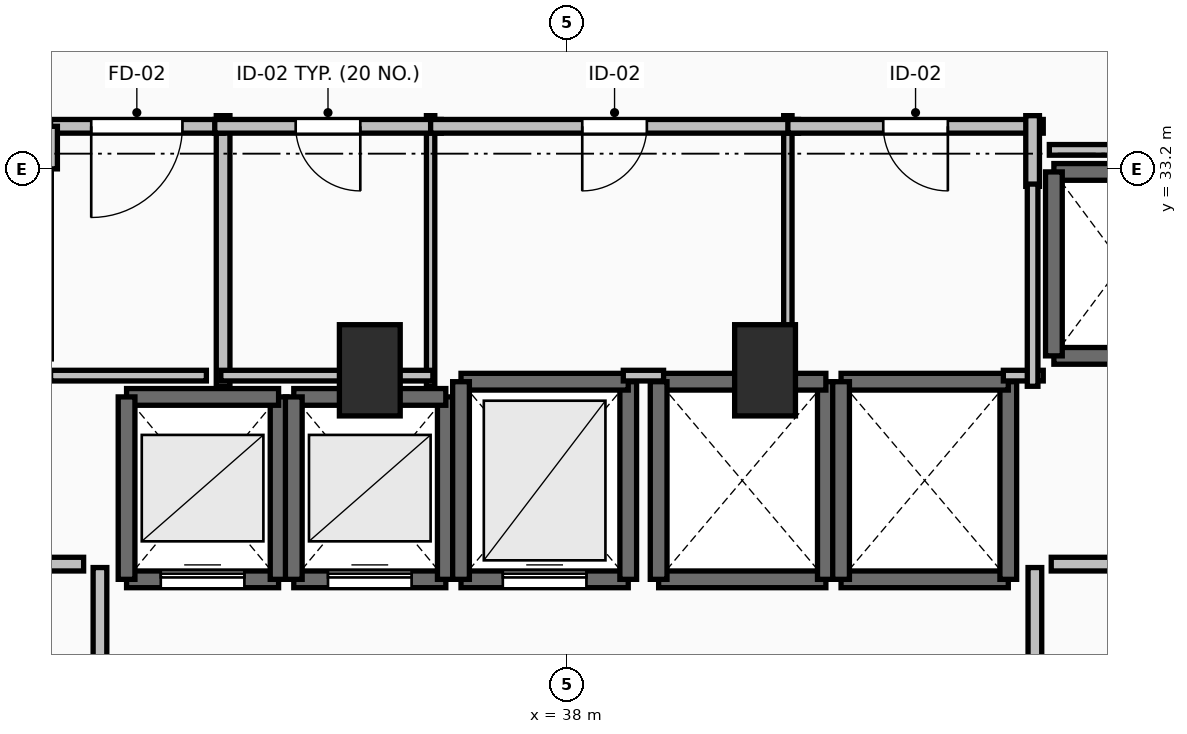
"""IFC4 building model, lengths in metres.
Left out: names, types, materials, properties, quantities, classifications, styles, units other than length and angle.
Written with IfcOpenShell. Run it as: python <this file> out.ifc"""

import sys

from ifc_helpers import new_model, si_unit, direction, frame, frame_2d, origin, origin_2d, place, context, subcontext, project, spatial, rectangle, extrude, element, fill, save


model = new_model("IFC4")
c1 = context("Model", 3, precision=1e-05, world=origin(), true_north=direction((0.0, 1.0)))
c2 = subcontext(c1, "Body", "Model", "MODEL_VIEW")
j1 = project(units=[si_unit("LENGTHUNIT", "METRE"), si_unit("PLANEANGLEUNIT", "RADIAN")], contexts=[c1])
p1 = place(None, origin())
s1 = spatial("IfcSite", under=j1, at=p1, CompositionType="ELEMENT")
p2 = place(p1, origin())
s2 = spatial("IfcBuilding", under=s1, at=p2, CompositionType="ELEMENT")
p3 = place(p2, frame((0.0, 0.0, 113.8)))
s3 = spatial("IfcBuildingStorey", under=s2, at=p3, CompositionType="ELEMENT", Elevation=113.8)
for number, where, z_axis, x_axis in (
    (1, (35.4, 30.55, 0.0), (0.0, 0.0, 1.0), (1.0, 0.0, 0.0)),
    (2, (40.6, 30.55, 0.0), (0.0, 0.0, 1.0), (1.0, 0.0, 0.0)),
):
    element("IfcColumn", number, at=place(p3, frame(where, z_axis=z_axis, x_axis=x_axis)), inside=s3, PredefinedType="PILASTER", context=c2, shape_type="SweptSolid", body=[
        extrude(rectangle(XDim=0.8, YDim=1.2, at=origin_2d()), origin(), (0.0, 0.0, 1.0), 3.5),
    ])
p4 = place(p3, frame((32.2, 27.8, 0.0), z_axis=(0.0, 0.0, 1.0), x_axis=(1.0, 0.0, 0.0)))
e3 = element("IfcWall", 3, at=p4, inside=s3, PredefinedType="SOLIDWALL", context=c2, shape_type="SweptSolid", body=[
    extrude(rectangle(XDim=2.0, YDim=0.22, at=frame_2d((1.0, 0.0))), origin(), (0.0, 0.0, 1.0), 3.24),
])
p5 = place(p4, frame((0.45, 0.0, 0.0)))
e4 = element("IfcOpeningElement", 4, at=p5, cuts=e3, PredefinedType="OPENING", context=c2, shape_type="SweptSolid", body=[
    extrude(rectangle(XDim=1.1, YDim=2.2, at=frame_2d((0.55, 1.1))), frame((0.0, 0.125, 0.0), z_axis=(0.0, -1.0, 0.0), x_axis=(1.0, 0.0, 0.0)), (0.0, 0.0, 1.0), 0.25),
])
p6 = place(p3, frame((34.2, 27.8, 0.0), z_axis=(0.0, 0.0, 1.0), x_axis=(0.0, 1.0, 0.0)))
e5 = element("IfcWall", 5, at=p6, inside=s3, PredefinedType="SOLIDWALL", context=c2, shape_type="SweptSolid", body=[
    extrude(rectangle(XDim=2.4, YDim=0.22, at=frame_2d((1.2, 0.0))), origin(), (0.0, 0.0, 1.0), 3.24),
])
p7 = place(p3, frame((34.2, 30.2, 0.0), z_axis=(0.0, 0.0, 1.0), x_axis=(-1.0, 0.0, 0.0)))
e6 = element("IfcWall", 6, at=p7, inside=s3, PredefinedType="SOLIDWALL", context=c2, shape_type="SweptSolid", body=[
    extrude(rectangle(XDim=2.0, YDim=0.22, at=frame_2d((1.0, 0.0))), origin(), (0.0, 0.0, 1.0), 3.24),
])
p8 = place(p3, frame((32.2, 30.2, 0.0), z_axis=(0.0, 0.0, 1.0), x_axis=(0.0, -1.0, 0.0)))
e7 = element("IfcWall", 7, at=p8, inside=s3, PredefinedType="SOLIDWALL", context=c2, shape_type="SweptSolid", body=[
    extrude(rectangle(XDim=2.4, YDim=0.22, at=frame_2d((1.2, 0.0))), origin(), (0.0, 0.0, 1.0), 3.24),
])
p9 = place(p3, frame((34.4, 27.8, 0.0), z_axis=(0.0, 0.0, 1.0), x_axis=(1.0, 0.0, 0.0)))
e8 = element("IfcWall", 8, at=p9, inside=s3, PredefinedType="SOLIDWALL", context=c2, shape_type="SweptSolid", body=[
    extrude(rectangle(XDim=2.0, YDim=0.22, at=frame_2d((1.0, 0.0))), origin(), (0.0, 0.0, 1.0), 3.24),
])
p10 = place(p9, frame((0.45, 0.0, 0.0)))
e9 = element("IfcOpeningElement", 9, at=p10, cuts=e8, PredefinedType="OPENING", context=c2, shape_type="SweptSolid", body=[
    extrude(rectangle(XDim=1.1, YDim=2.2, at=frame_2d((0.55, 1.1))), frame((0.0, 0.125, 0.0), z_axis=(0.0, -1.0, 0.0), x_axis=(1.0, 0.0, 0.0)), (0.0, 0.0, 1.0), 0.25),
])
p11 = place(p3, frame((36.4, 27.8, 0.0), z_axis=(0.0, 0.0, 1.0), x_axis=(0.0, 1.0, 0.0)))
e10 = element("IfcWall", 10, at=p11, inside=s3, PredefinedType="SOLIDWALL", context=c2, shape_type="SweptSolid", body=[
    extrude(rectangle(XDim=2.4, YDim=0.22, at=frame_2d((1.2, 0.0))), origin(), (0.0, 0.0, 1.0), 3.24),
])
p12 = place(p3, frame((36.4, 30.2, 0.0), z_axis=(0.0, 0.0, 1.0), x_axis=(-1.0, 0.0, 0.0)))
e11 = element("IfcWall", 11, at=p12, inside=s3, PredefinedType="SOLIDWALL", context=c2, shape_type="SweptSolid", body=[
    extrude(rectangle(XDim=2.0, YDim=0.22, at=frame_2d((1.0, 0.0))), origin(), (0.0, 0.0, 1.0), 3.24),
])
p13 = place(p3, frame((34.4, 30.2, 0.0), z_axis=(0.0, 0.0, 1.0), x_axis=(0.0, -1.0, 0.0)))
e12 = element("IfcWall", 12, at=p13, inside=s3, PredefinedType="SOLIDWALL", context=c2, shape_type="SweptSolid", body=[
    extrude(rectangle(XDim=2.4, YDim=0.22, at=frame_2d((1.2, 0.0))), origin(), (0.0, 0.0, 1.0), 3.24),
])
p14 = place(p3, frame((36.6, 27.8, 0.0), z_axis=(0.0, 0.0, 1.0), x_axis=(1.0, 0.0, 0.0)))
e13 = element("IfcWall", 13, at=p14, inside=s3, PredefinedType="SOLIDWALL", context=c2, shape_type="SweptSolid", body=[
    extrude(rectangle(XDim=2.2, YDim=0.22, at=frame_2d((1.1, 0.0))), origin(), (0.0, 0.0, 1.0), 3.24),
])
p15 = place(p14, frame((0.55, 0.0, 0.0)))
e14 = element("IfcOpeningElement", 14, at=p15, cuts=e13, PredefinedType="OPENING", context=c2, shape_type="SweptSolid", body=[
    extrude(rectangle(XDim=1.1, YDim=2.2, at=frame_2d((0.55, 1.1))), frame((0.0, 0.125, 0.0), z_axis=(0.0, -1.0, 0.0), x_axis=(1.0, 0.0, 0.0)), (0.0, 0.0, 1.0), 0.25),
])
p16 = place(p3, frame((38.8, 27.8, 0.0), z_axis=(0.0, 0.0, 1.0), x_axis=(0.0, 1.0, 0.0)))
e15 = element("IfcWall", 15, at=p16, inside=s3, PredefinedType="SOLIDWALL", context=c2, shape_type="SweptSolid", body=[
    extrude(rectangle(XDim=2.6, YDim=0.22, at=frame_2d((1.3, 0.0))), origin(), (0.0, 0.0, 1.0), 3.24),
])
p17 = place(p3, frame((38.8, 30.4, 0.0), z_axis=(0.0, 0.0, 1.0), x_axis=(-1.0, 0.0, 0.0)))
e16 = element("IfcWall", 16, at=p17, inside=s3, PredefinedType="SOLIDWALL", context=c2, shape_type="SweptSolid", body=[
    extrude(rectangle(XDim=2.2, YDim=0.22, at=frame_2d((1.1, 0.0))), origin(), (0.0, 0.0, 1.0), 3.24),
])
p18 = place(p3, frame((36.6, 30.4, 0.0), z_axis=(0.0, 0.0, 1.0), x_axis=(0.0, -1.0, 0.0)))
e17 = element("IfcWall", 17, at=p18, inside=s3, PredefinedType="SOLIDWALL", context=c2, shape_type="SweptSolid", body=[
    extrude(rectangle(XDim=2.6, YDim=0.22, at=frame_2d((1.3, 0.0))), origin(), (0.0, 0.0, 1.0), 3.24),
])
p19 = place(p3, frame((39.2, 27.8, 0.0), z_axis=(0.0, 0.0, 1.0), x_axis=(1.0, 0.0, 0.0)))
e18 = element("IfcWall", 18, at=p19, inside=s3, PredefinedType="SOLIDWALL", context=c2, shape_type="SweptSolid", body=[
    extrude(rectangle(XDim=2.2, YDim=0.22, at=frame_2d((1.1, 0.0))), origin(), (0.0, 0.0, 1.0), 3.24),
])
p20 = place(p3, frame((41.4, 27.8, 0.0), z_axis=(0.0, 0.0, 1.0), x_axis=(0.0, 1.0, 0.0)))
e19 = element("IfcWall", 19, at=p20, inside=s3, PredefinedType="SOLIDWALL", context=c2, shape_type="SweptSolid", body=[
    extrude(rectangle(XDim=2.6, YDim=0.22, at=frame_2d((1.3, 0.0))), origin(), (0.0, 0.0, 1.0), 3.24),
])
p21 = place(p3, frame((41.4, 30.4, 0.0), z_axis=(0.0, 0.0, 1.0), x_axis=(-1.0, 0.0, 0.0)))
e20 = element("IfcWall", 20, at=p21, inside=s3, PredefinedType="SOLIDWALL", context=c2, shape_type="SweptSolid", body=[
    extrude(rectangle(XDim=2.2, YDim=0.22, at=frame_2d((1.1, 0.0))), origin(), (0.0, 0.0, 1.0), 3.24),
])
p22 = place(p3, frame((39.2, 30.4, 0.0), z_axis=(0.0, 0.0, 1.0), x_axis=(0.0, -1.0, 0.0)))
e21 = element("IfcWall", 21, at=p22, inside=s3, PredefinedType="SOLIDWALL", context=c2, shape_type="SweptSolid", body=[
    extrude(rectangle(XDim=2.6, YDim=0.22, at=frame_2d((1.3, 0.0))), origin(), (0.0, 0.0, 1.0), 3.24),
])
p23 = place(p3, frame((41.6, 27.8, 0.0), z_axis=(0.0, 0.0, 1.0), x_axis=(1.0, 0.0, 0.0)))
e22 = element("IfcWall", 22, at=p23, inside=s3, PredefinedType="SOLIDWALL", context=c2, shape_type="SweptSolid", body=[
    extrude(rectangle(XDim=2.2, YDim=0.22, at=frame_2d((1.1, 0.0))), origin(), (0.0, 0.0, 1.0), 3.24),
])
p24 = place(p3, frame((43.8, 27.8, 0.0), z_axis=(0.0, 0.0, 1.0), x_axis=(0.0, 1.0, 0.0)))
e23 = element("IfcWall", 23, at=p24, inside=s3, PredefinedType="SOLIDWALL", context=c2, shape_type="SweptSolid", body=[
    extrude(rectangle(XDim=2.6, YDim=0.22, at=frame_2d((1.3, 0.0))), origin(), (0.0, 0.0, 1.0), 3.24),
])
p25 = place(p3, frame((43.8, 30.4, 0.0), z_axis=(0.0, 0.0, 1.0), x_axis=(-1.0, 0.0, 0.0)))
e24 = element("IfcWall", 24, at=p25, inside=s3, PredefinedType="SOLIDWALL", context=c2, shape_type="SweptSolid", body=[
    extrude(rectangle(XDim=2.2, YDim=0.22, at=frame_2d((1.1, 0.0))), origin(), (0.0, 0.0, 1.0), 3.24),
])
p26 = place(p3, frame((41.6, 30.4, 0.0), z_axis=(0.0, 0.0, 1.0), x_axis=(0.0, -1.0, 0.0)))
e25 = element("IfcWall", 25, at=p26, inside=s3, PredefinedType="SOLIDWALL", context=c2, shape_type="SweptSolid", body=[
    extrude(rectangle(XDim=2.6, YDim=0.22, at=frame_2d((1.3, 0.0))), origin(), (0.0, 0.0, 1.0), 3.24),
])
for number, where, z_axis, x_axis in (
    (26, (44.4, 30.74, 0.0), (0.0, 0.0, 1.0), (1.0, 0.0, 0.0)),
    (27, (46.2, 33.16, 0.0), (0.0, 0.0, 1.0), (-1.0, 0.0, 0.0)),
):
    element("IfcWall", number, at=place(p3, frame(where, z_axis=z_axis, x_axis=x_axis)), inside=s3, PredefinedType="SOLIDWALL", context=c2, shape_type="SweptSolid", body=[
        extrude(rectangle(XDim=1.8, YDim=0.22, at=frame_2d((0.9, 0.0))), origin(), (0.0, 0.0, 1.0), 3.24),
    ])
p27 = place(p3, frame((44.4, 33.16, 0.0), z_axis=(0.0, 0.0, 1.0), x_axis=(0.0, -1.0, 0.0)))
e28 = element("IfcWall", 28, at=p27, inside=s3, PredefinedType="SOLIDWALL", context=c2, shape_type="SweptSolid", body=[
    extrude(rectangle(XDim=2.42, YDim=0.22, at=frame_2d((1.21, 0.0))), origin(), (0.0, 0.0, 1.0), 3.24),
])
p28 = place(p3, frame((31.85, 24.045, 0.0), z_axis=(0.0, 0.0, 1.0), x_axis=(0.0, 1.0, 0.0)))
e29 = element("IfcWall", 29, at=p28, inside=s3, PredefinedType="PARTITIONING", context=c2, shape_type="SweptSolid", body=[
    extrude(rectangle(XDim=3.91, YDim=0.18, at=frame_2d((1.955, 0.0))), origin(), (0.0, 0.0, 1.0), 3.24),
])
p29 = place(p28, frame((1.355, 0.0, 0.0)))
e30 = element("IfcOpeningElement", 30, at=p29, cuts=e29, PredefinedType="OPENING", context=c2, shape_type="SweptSolid", body=[
    extrude(rectangle(XDim=1.2, YDim=2.15, at=frame_2d((0.6, 1.075))), frame((0.0, 0.105, 0.0), z_axis=(0.0, -1.0, 0.0), x_axis=(1.0, 0.0, 0.0)), (0.0, 0.0, 1.0), 0.21),
])
p30 = place(p3, frame((44.15, 27.955, 0.0), z_axis=(0.0, 0.0, 1.0), x_axis=(0.0, -1.0, 0.0)))
e31 = element("IfcWall", 31, at=p30, inside=s3, PredefinedType="PARTITIONING", context=c2, shape_type="SweptSolid", body=[
    extrude(rectangle(XDim=3.91, YDim=0.18, at=frame_2d((1.955, 0.0))), origin(), (0.0, 0.0, 1.0), 3.24),
])
p31 = place(p30, frame((1.355, 0.0, 0.0)))
e32 = element("IfcOpeningElement", 32, at=p31, cuts=e31, PredefinedType="OPENING", context=c2, shape_type="SweptSolid", body=[
    extrude(rectangle(XDim=1.2, YDim=2.15, at=frame_2d((0.6, 1.075))), frame((0.0, 0.105, 0.0), z_axis=(0.0, -1.0, 0.0), x_axis=(1.0, 0.0, 0.0)), (0.0, 0.0, 1.0), 0.21),
])
p32 = place(p3, frame((33.47, 30.34, 0.0), z_axis=(0.0, 0.0, 1.0), x_axis=(0.0, 1.0, 0.0)))
e33 = element("IfcWall", 33, at=p32, inside=s3, PredefinedType="PARTITIONING", context=c2, shape_type="SweptSolid", body=[
    extrude(rectangle(XDim=3.56, YDim=0.18, at=frame_2d((1.78, 0.0))), origin(), (0.0, 0.0, 1.0), 3.24),
])
p33 = place(p3, frame((33.47, 33.76, 0.0), z_axis=(0.0, 0.0, 1.0), x_axis=(-1.0, 0.0, 0.0)))
e34 = element("IfcWall", 34, at=p33, inside=s3, PredefinedType="PARTITIONING", context=c2, shape_type="SweptSolid", body=[
    extrude(rectangle(XDim=2.27, YDim=0.18, at=frame_2d((1.135, 0.0))), origin(), (0.0, 0.0, 1.0), 3.24),
])
p34 = place(p33, frame((0.535, 0.0, 0.0)))
e35 = element("IfcOpeningElement", 35, at=p34, cuts=e34, PredefinedType="OPENING", context=c2, shape_type="SweptSolid", body=[
    extrude(rectangle(XDim=1.2, YDim=2.15, at=frame_2d((0.6, 1.075))), frame((0.0, 0.105, 0.0), z_axis=(0.0, -1.0, 0.0), x_axis=(1.0, 0.0, 0.0)), (0.0, 0.0, 1.0), 0.21),
])
p35 = place(p3, frame((31.2, 33.76, 0.0), z_axis=(0.0, 0.0, 1.0), x_axis=(0.0, -1.0, 0.0)))
e36 = element("IfcWall", 36, at=p35, inside=s3, PredefinedType="PARTITIONING", context=c2, shape_type="SweptSolid", body=[
    extrude(rectangle(XDim=0.56, YDim=0.18, at=frame_2d((0.28, 0.0))), origin(), (0.0, 0.0, 1.0), 3.24),
])
p36 = place(p3, frame((36.2, 30.34, 0.0), z_axis=(0.0, 0.0, 1.0), x_axis=(0.0, 1.0, 0.0)))
e37 = element("IfcWall", 37, at=p36, inside=s3, PredefinedType="PARTITIONING", context=c2, shape_type="SweptSolid", body=[
    extrude(rectangle(XDim=3.56, YDim=0.11, at=frame_2d((1.78, 0.0))), origin(), (0.0, 0.0, 1.0), 2.432),
])
p37 = place(p3, frame((36.34, 33.76, 0.0), z_axis=(0.0, 0.0, 1.0), x_axis=(-1.0, 0.0, 0.0)))
e38 = element("IfcWall", 38, at=p37, inside=s3, PredefinedType="PARTITIONING", context=c2, shape_type="SweptSolid", body=[
    extrude(rectangle(XDim=2.98, YDim=0.18, at=frame_2d((1.49, 0.0))), origin(), (0.0, 0.0, 1.0), 3.24),
])
p38 = place(p37, frame((1.065, 0.0, 0.0)))
e39 = element("IfcOpeningElement", 39, at=p38, cuts=e38, PredefinedType="OPENING", context=c2, shape_type="SweptSolid", body=[
    extrude(rectangle(XDim=0.85, YDim=2.1, at=frame_2d((0.425, 1.05))), frame((0.0, 0.105, 0.0), z_axis=(0.0, -1.0, 0.0), x_axis=(1.0, 0.0, 0.0)), (0.0, 0.0, 1.0), 0.21),
])
p39 = place(p3, frame((40.9, 30.34, 0.0), z_axis=(0.0, 0.0, 1.0), x_axis=(0.0, 1.0, 0.0)))
e40 = element("IfcWall", 40, at=p39, inside=s3, PredefinedType="PARTITIONING", context=c2, shape_type="SweptSolid", body=[
    extrude(rectangle(XDim=3.56, YDim=0.11, at=frame_2d((1.78, 0.0))), origin(), (0.0, 0.0, 1.0), 3.24),
])
p40 = place(p3, frame((41.04, 33.76, 0.0), z_axis=(0.0, 0.0, 1.0), x_axis=(-1.0, 0.0, 0.0)))
e41 = element("IfcWall", 41, at=p40, inside=s3, PredefinedType="PARTITIONING", context=c2, shape_type="SweptSolid", body=[
    extrude(rectangle(XDim=4.84, YDim=0.18, at=frame_2d((2.42, 0.0))), origin(), (0.0, 0.0, 1.0), 3.24),
])
p41 = place(p40, frame((1.995, 0.0, 0.0)))
e42 = element("IfcOpeningElement", 42, at=p41, cuts=e41, PredefinedType="OPENING", context=c2, shape_type="SweptSolid", body=[
    extrude(rectangle(XDim=0.85, YDim=2.1, at=frame_2d((0.425, 1.05))), frame((0.0, 0.105, 0.0), z_axis=(0.0, -1.0, 0.0), x_axis=(1.0, 0.0, 0.0)), (0.0, 0.0, 1.0), 0.21),
])
p42 = place(p3, frame((44.26, 33.76, 0.0), z_axis=(0.0, 0.0, 1.0), x_axis=(-1.0, 0.0, 0.0)))
e43 = element("IfcWall", 43, at=p42, inside=s3, PredefinedType="PARTITIONING", context=c2, shape_type="SweptSolid", body=[
    extrude(rectangle(XDim=3.36, YDim=0.18, at=frame_2d((1.68, 0.0))), origin(), (0.0, 0.0, 1.0), 3.24),
])
p43 = place(p42, frame((1.255, 0.0, 0.0)))
e44 = element("IfcOpeningElement", 44, at=p43, cuts=e43, PredefinedType="OPENING", context=c2, shape_type="SweptSolid", body=[
    extrude(rectangle(XDim=0.85, YDim=2.1, at=frame_2d((0.425, 1.05))), frame((0.0, 0.105, 0.0), z_axis=(0.0, -1.0, 0.0), x_axis=(1.0, 0.0, 0.0)), (0.0, 0.0, 1.0), 0.21),
])
p44 = place(p3, frame((44.12, 32.97, 0.0), z_axis=(0.0, 0.0, 1.0), x_axis=(0.0, 1.0, 0.0)))
e45 = element("IfcWall", 45, at=p44, inside=s3, PredefinedType="PARTITIONING", context=c2, shape_type="SweptSolid", body=[
    extrude(rectangle(XDim=0.93, YDim=0.18, at=frame_2d((0.465, 0.0))), origin(), (0.0, 0.0, 1.0), 3.24),
])
for number, where, z_axis, x_axis in (
    (46, (31.635, 28.0, 0.0), (0.0, 0.0, 1.0), (-1.0, 0.0, 0.0)),
    (47, (45.28, 28.0, 0.0), (0.0, 0.0, 1.0), (-1.0, 0.0, 0.0)),
):
    element("IfcWall", number, at=place(p3, frame(where, z_axis=z_axis, x_axis=x_axis)), inside=s3, PredefinedType="PARTITIONING", context=c2, shape_type="SweptSolid", body=[
        extrude(rectangle(XDim=0.915, YDim=0.18, at=frame_2d((0.458, 0.0))), origin(), (0.0, 0.0, 1.0), 3.24),
    ])
p45 = place(p3, frame((31.2, 30.48, 0.0), z_axis=(0.0, 0.0, 1.0), x_axis=(1.0, 0.0, 0.0)))
e48 = element("IfcWall", 48, at=p45, inside=s3, PredefinedType="PARTITIONING", context=c2, shape_type="SweptSolid", body=[
    extrude(rectangle(XDim=2.05, YDim=0.14, at=frame_2d((1.025, 0.0))), origin(), (0.0, 0.0, 1.0), 3.24),
])
p46 = place(p3, frame((33.44, 30.48, 0.0), z_axis=(0.0, 0.0, 1.0), x_axis=(1.0, 0.0, 0.0)))
e49 = element("IfcWall", 49, at=p46, inside=s3, PredefinedType="PARTITIONING", context=c2, shape_type="SweptSolid", body=[
    extrude(rectangle(XDim=2.79, YDim=0.14, at=frame_2d((1.395, 0.0))), origin(), (0.0, 0.0, 1.0), 2.432),
])
p47 = place(p3, frame((38.735, 30.48, 0.0), z_axis=(0.0, 0.0, 1.0), x_axis=(1.0, 0.0, 0.0)))
e50 = element("IfcWall", 50, at=p47, inside=s3, PredefinedType="PARTITIONING", context=c2, shape_type="SweptSolid", body=[
    extrude(rectangle(XDim=0.53, YDim=0.14, at=frame_2d((0.265, 0.0))), origin(), (0.0, 0.0, 1.0), 2.432),
])
p48 = place(p3, frame((43.735, 30.48, 0.0), z_axis=(0.0, 0.0, 1.0), x_axis=(1.0, 0.0, 0.0)))
e51 = element("IfcWall", 51, at=p48, inside=s3, PredefinedType="PARTITIONING", context=c2, shape_type="SweptSolid", body=[
    extrude(rectangle(XDim=0.525, YDim=0.14, at=frame_2d((0.262, 0.0))), origin(), (0.0, 0.0, 1.0), 3.24),
])
p49 = place(p3, frame((44.12, 30.34, 0.0), z_axis=(0.0, 0.0, 1.0), x_axis=(0.0, 1.0, 0.0)))
e52 = element("IfcWall", 52, at=p49, inside=s3, PredefinedType="PARTITIONING", context=c2, shape_type="SweptSolid", body=[
    extrude(rectangle(XDim=2.66, YDim=0.14, at=frame_2d((1.33, 0.0))), origin(), (0.0, 0.0, 1.0), 3.24),
])
p50 = place(p3, frame((44.34, 33.45, 0.0), z_axis=(0.0, 0.0, 1.0), x_axis=(1.0, 0.0, 0.0)))
e53 = element("IfcWall", 53, at=p50, inside=s3, PredefinedType="PARTITIONING", context=c2, shape_type="SweptSolid", body=[
    extrude(rectangle(XDim=4.21, YDim=0.14, at=frame_2d((2.105, 0.0))), origin(), (0.0, 0.0, 1.0), 2.432),
])
p51 = place(p5, origin())
e54 = element("IfcDoor", 54, at=p51, inside=s3, OperationType="SLIDING_TO_LEFT", PredefinedType="DOOR", context=c2, shape_type="SweptSolid", body=[
    extrude(rectangle(XDim=1.1, YDim=2.2, at=frame_2d((0.55, 1.1))), frame((0.0, 0.025, 0.0), z_axis=(0.0, -1.0, 0.0), x_axis=(1.0, 0.0, 0.0)), (0.0, 0.0, 1.0), 0.05),
])
fill(e4, e54)
p52 = place(p10, origin())
e55 = element("IfcDoor", 55, at=p52, inside=s3, OperationType="SLIDING_TO_LEFT", PredefinedType="DOOR", context=c2, shape_type="SweptSolid", body=[
    extrude(rectangle(XDim=1.1, YDim=2.2, at=frame_2d((0.55, 1.1))), frame((0.0, 0.025, 0.0), z_axis=(0.0, -1.0, 0.0), x_axis=(1.0, 0.0, 0.0)), (0.0, 0.0, 1.0), 0.05),
])
fill(e9, e55)
p53 = place(p15, origin())
e56 = element("IfcDoor", 56, at=p53, inside=s3, OperationType="SLIDING_TO_LEFT", PredefinedType="DOOR", context=c2, shape_type="SweptSolid", body=[
    extrude(rectangle(XDim=1.1, YDim=2.2, at=frame_2d((0.55, 1.1))), frame((0.0, 0.025, 0.0), z_axis=(0.0, -1.0, 0.0), x_axis=(1.0, 0.0, 0.0)), (0.0, 0.0, 1.0), 0.05),
])
fill(e14, e56)
p54 = place(p34, origin())
e57 = element("IfcDoor", 57, at=p54, inside=s3, OperationType="SINGLE_SWING_RIGHT", PredefinedType="DOOR", context=c2, shape_type="SweptSolid", body=[
    extrude(rectangle(XDim=1.2, YDim=2.15, at=frame_2d((0.6, 1.075))), frame((0.0, 0.025, 0.0), z_axis=(0.0, -1.0, 0.0), x_axis=(1.0, 0.0, 0.0)), (0.0, 0.0, 1.0), 0.05),
])
fill(e35, e57)
p55 = place(p38, origin())
e58 = element("IfcDoor", 58, at=p55, inside=s3, OperationType="SINGLE_SWING_LEFT", PredefinedType="DOOR", context=c2, shape_type="SweptSolid", body=[
    extrude(rectangle(XDim=0.85, YDim=2.1, at=frame_2d((0.425, 1.05))), frame((0.0, 0.025, 0.0), z_axis=(0.0, -1.0, 0.0), x_axis=(1.0, 0.0, 0.0)), (0.0, 0.0, 1.0), 0.05),
])
fill(e39, e58)
p56 = place(p41, origin())
e59 = element("IfcDoor", 59, at=p56, inside=s3, OperationType="SINGLE_SWING_RIGHT", PredefinedType="DOOR", context=c2, shape_type="SweptSolid", body=[
    extrude(rectangle(XDim=0.85, YDim=2.1, at=frame_2d((0.425, 1.05))), frame((0.0, 0.025, 0.0), z_axis=(0.0, -1.0, 0.0), x_axis=(1.0, 0.0, 0.0)), (0.0, 0.0, 1.0), 0.05),
])
fill(e42, e59)
p57 = place(p43, origin())
e60 = element("IfcDoor", 60, at=p57, inside=s3, OperationType="SINGLE_SWING_LEFT", PredefinedType="DOOR", context=c2, shape_type="SweptSolid", body=[
    extrude(rectangle(XDim=0.85, YDim=2.1, at=frame_2d((0.425, 1.05))), frame((0.0, 0.025, 0.0), z_axis=(0.0, -1.0, 0.0), x_axis=(1.0, 0.0, 0.0)), (0.0, 0.0, 1.0), 0.05),
])
fill(e44, e60)
save(model, sys.argv[1])
